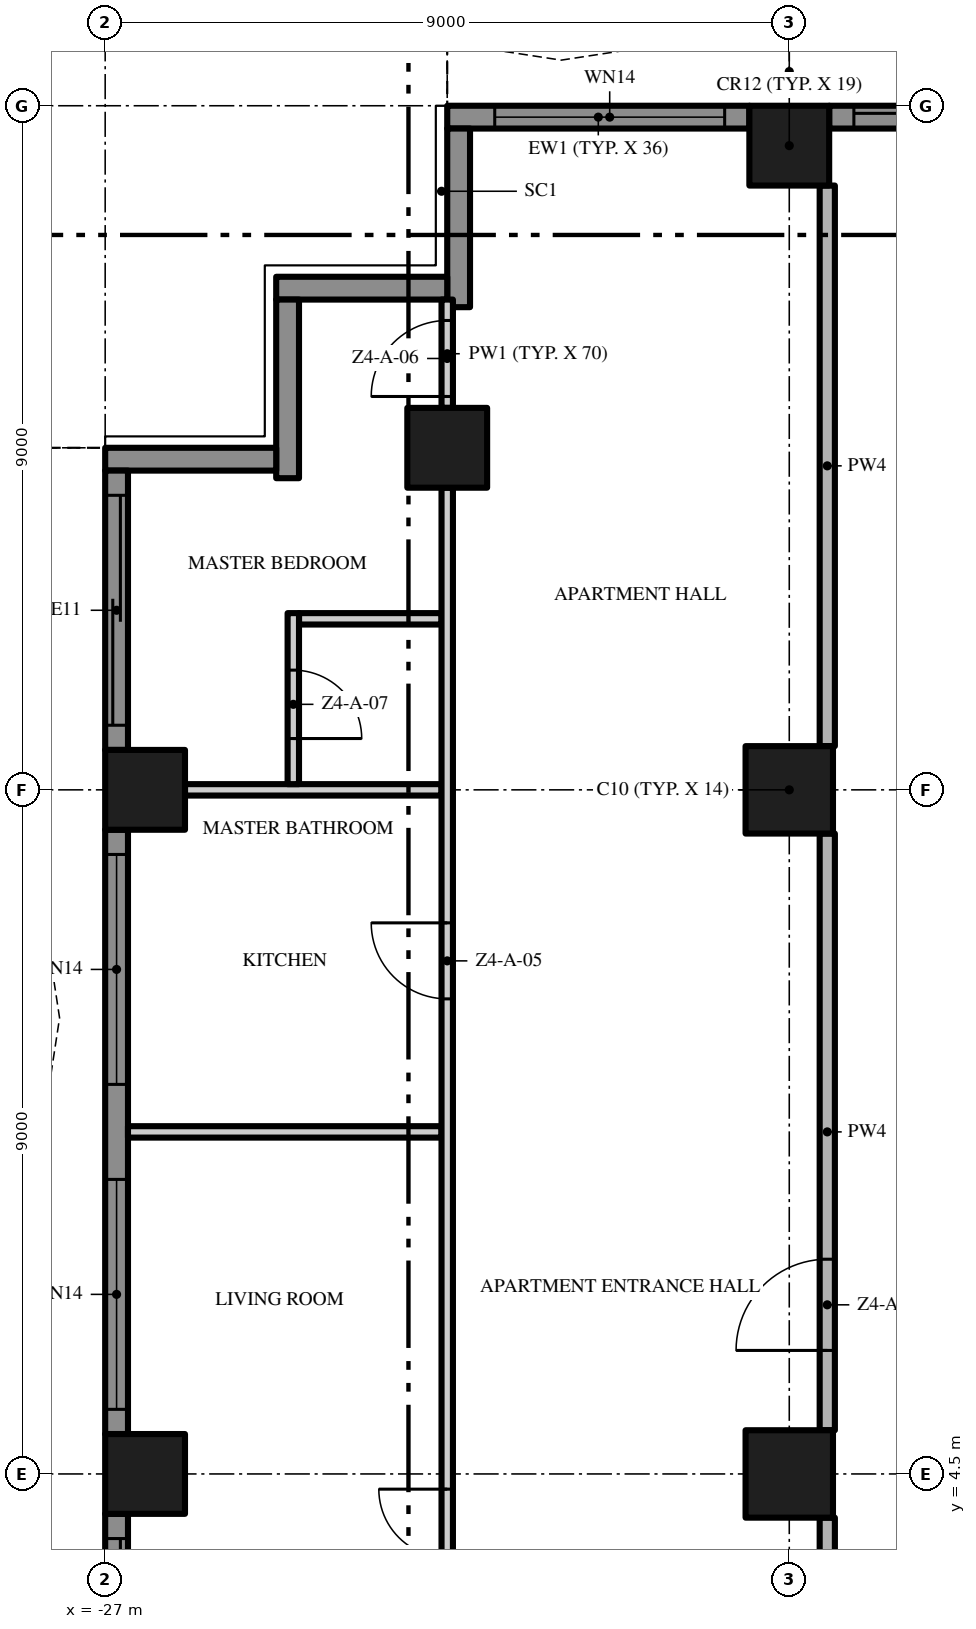
"""IFC4 building model, lengths in metres.
Left out: names, types, materials, properties, quantities, classifications, styles, units other than length and angle.
Written with IfcOpenShell. Run it as: python <this file> out.ifc"""

import sys

from ifc_helpers import new_model, si_unit, direction, frame, frame_2d, origin, origin_2d, place, context, subcontext, project, spatial, polyline, rectangle, outline, extrude, element, fill, save


model = new_model("IFC4")
c1 = context("Model", 3, precision=1e-05, world=origin(), true_north=direction((0.0, 1.0)))
c2 = subcontext(c1, "Body", "Model", "MODEL_VIEW")
j1 = project(units=[si_unit("LENGTHUNIT", "METRE"), si_unit("PLANEANGLEUNIT", "RADIAN")], contexts=[c1])
p1 = place(None, origin())
s1 = spatial("IfcSite", under=j1, at=p1, CompositionType="ELEMENT")
p2 = place(p1, origin())
s2 = spatial("IfcBuilding", under=s1, at=p2, CompositionType="ELEMENT")
p3 = place(p2, frame((0.0, 0.0, 188.2)))
s3 = spatial("IfcBuildingStorey", under=s2, at=p3, CompositionType="ELEMENT", Elevation=188.2)
p4 = place(p3, frame((-18.0, 13.5, 0.0), z_axis=(0.0, 0.0, 1.0), x_axis=(1.0, 0.0, 0.0)))
e1 = element("IfcColumn", 1, at=p4, inside=s3, PredefinedType="COLUMN", context=c2, shape_type="SweptSolid", body=[
    extrude(rectangle(XDim=1.15, YDim=1.15, at=origin_2d()), origin(), (0.0, 0.0, 1.0), 3.5),
])
p5 = place(p3, frame((-18.0, 21.975, 0.0), z_axis=(0.0, 0.0, 1.0), x_axis=(1.0, 0.0, 0.0)))
e2 = element("IfcColumn", 2, at=p5, inside=s3, PredefinedType="COLUMN", context=c2, shape_type="SweptSolid", body=[
    extrude(rectangle(XDim=1.05, YDim=1.05, at=origin_2d()), origin(), (0.0, 0.0, 1.0), 3.5),
])
p6 = place(p3, frame((-18.0, 4.5, 0.0), z_axis=(0.0, 0.0, 1.0), x_axis=(1.0, 0.0, 0.0)))
e3 = element("IfcColumn", 3, at=p6, inside=s3, PredefinedType="COLUMN", context=c2, shape_type="SweptSolid", body=[
    extrude(rectangle(XDim=1.15, YDim=1.15, at=origin_2d()), origin(), (0.0, 0.0, 1.0), 3.5),
])
for number, where, z_axis, x_axis in (
    (4, (-26.475, 13.5, 0.0), (0.0, 0.0, 1.0), (1.0, 0.0, 0.0)),
    (5, (-22.5, 18.0, 0.0), (0.0, 0.0, 1.0), (1.0, 0.0, 0.0)),
    (6, (-26.475, 4.5, 0.0), (0.0, 0.0, 1.0), (1.0, 0.0, 0.0)),
):
    element("IfcColumn", number, at=place(p3, frame(where, z_axis=z_axis, x_axis=x_axis)), inside=s3, PredefinedType="COLUMN", context=c2, shape_type="SweptSolid", body=[
        extrude(rectangle(XDim=1.05, YDim=1.05, at=origin_2d()), origin(), (0.0, 0.0, 1.0), 3.5),
    ])
p7 = place(p3, frame((-17.475, 22.35, 0.0), z_axis=(0.0, 0.0, 1.0), x_axis=(1.0, 0.0, 0.0)))
e7 = element("IfcWall", 7, at=p7, inside=s3, PredefinedType="SOLIDWALL", context=c2, shape_type="SweptSolid", body=[
    extrude(rectangle(XDim=3.975, YDim=0.3, at=frame_2d((1.988, 0.0))), origin(), (0.0, 0.0, 1.0), 3.5),
])
p8 = place(p7, frame((0.325, 0.0, 0.0)))
e8 = element("IfcOpeningElement", 8, at=p8, cuts=e7, PredefinedType="OPENING", context=c2, shape_type="SweptSolid", body=[
    extrude(rectangle(XDim=3.025, YDim=2.4, at=frame_2d((1.512, 1.2))), frame((0.0, 0.16, 0.0), z_axis=(0.0, -1.0, 0.0), x_axis=(1.0, 0.0, 0.0)), (0.0, 0.0, 1.0), 0.32),
])
p9 = place(p3, frame((-22.5, 22.35, 0.0), z_axis=(0.0, 0.0, 1.0), x_axis=(1.0, 0.0, 0.0)))
e9 = element("IfcWall", 9, at=p9, inside=s3, PredefinedType="SOLIDWALL", context=c2, shape_type="SweptSolid", body=[
    extrude(rectangle(XDim=3.975, YDim=0.3, at=frame_2d((1.988, 0.0))), origin(), (0.0, 0.0, 1.0), 3.5),
])
p10 = place(p9, frame((0.625, 0.0, 0.45)))
e10 = element("IfcOpeningElement", 10, at=p10, cuts=e9, PredefinedType="OPENING", context=c2, shape_type="SweptSolid", body=[
    extrude(rectangle(XDim=3.025, YDim=2.65, at=frame_2d((1.512, 1.325))), frame((0.0, 0.16, 0.0), z_axis=(0.0, -1.0, 0.0), x_axis=(1.0, 0.0, 0.0)), (0.0, 0.0, 1.0), 0.32),
])
p11 = place(p3, frame((-22.35, 19.85, 0.0), z_axis=(0.0, 0.0, 1.0), x_axis=(0.0, 1.0, 0.0)))
e11 = element("IfcWall", 11, at=p11, inside=s3, PredefinedType="SOLIDWALL", context=c2, shape_type="SweptSolid", body=[
    extrude(rectangle(XDim=2.35, YDim=0.3, at=frame_2d((1.175, 0.0))), origin(), (0.0, 0.0, 1.0), 3.5),
])
p12 = place(p3, frame((-24.75, 20.1, 0.0), z_axis=(0.0, 0.0, 1.0), x_axis=(1.0, 0.0, 0.0)))
e12 = element("IfcWall", 12, at=p12, inside=s3, PredefinedType="SOLIDWALL", context=c2, shape_type="SweptSolid", body=[
    extrude(rectangle(XDim=2.25, YDim=0.3, at=frame_2d((1.125, 0.0))), origin(), (0.0, 0.0, 1.0), 3.5),
])
p13 = place(p3, frame((-24.6, 17.6, 0.0), z_axis=(0.0, 0.0, 1.0), x_axis=(0.0, 1.0, 0.0)))
e13 = element("IfcWall", 13, at=p13, inside=s3, PredefinedType="SOLIDWALL", context=c2, shape_type="SweptSolid", body=[
    extrude(rectangle(XDim=2.35, YDim=0.3, at=frame_2d((1.175, 0.0))), origin(), (0.0, 0.0, 1.0), 3.5),
])
p14 = place(p3, frame((-27.0, 17.85, 0.0), z_axis=(0.0, 0.0, 1.0), x_axis=(1.0, 0.0, 0.0)))
e14 = element("IfcWall", 14, at=p14, inside=s3, PredefinedType="SOLIDWALL", context=c2, shape_type="SweptSolid", body=[
    extrude(rectangle(XDim=2.25, YDim=0.3, at=frame_2d((1.125, 0.0))), origin(), (0.0, 0.0, 1.0), 3.5),
])
p15 = place(p3, frame((-26.85, 14.025, 0.0), z_axis=(0.0, 0.0, 1.0), x_axis=(0.0, 1.0, 0.0)))
e15 = element("IfcWall", 15, at=p15, inside=s3, PredefinedType="SOLIDWALL", context=c2, shape_type="SweptSolid", body=[
    extrude(rectangle(XDim=3.675, YDim=0.3, at=frame_2d((1.837, 0.0))), origin(), (0.0, 0.0, 1.0), 3.5),
])
p16 = place(p15, frame((0.325, 0.0, 0.0)))
e16 = element("IfcOpeningElement", 16, at=p16, cuts=e15, PredefinedType="OPENING", context=c2, shape_type="SweptSolid", body=[
    extrude(rectangle(XDim=3.025, YDim=2.4, at=frame_2d((1.512, 1.2))), frame((0.0, 0.16, 0.0), z_axis=(0.0, -1.0, 0.0), x_axis=(1.0, 0.0, 0.0)), (0.0, 0.0, 1.0), 0.32),
])
p17 = place(p3, frame((-26.85, 5.025, 0.0), z_axis=(0.0, 0.0, 1.0), x_axis=(0.0, 1.0, 0.0)))
e17 = element("IfcWall", 17, at=p17, inside=s3, PredefinedType="SOLIDWALL", context=c2, shape_type="SweptSolid", body=[
    extrude(rectangle(XDim=7.95, YDim=0.3, at=frame_2d((3.975, 0.0))), origin(), (0.0, 0.0, 1.0), 3.5),
])
p18 = place(p17, frame((4.6, 0.0, 0.45)))
e18 = element("IfcOpeningElement", 18, at=p18, cuts=e17, PredefinedType="OPENING", context=c2, shape_type="SweptSolid", body=[
    extrude(rectangle(XDim=3.025, YDim=2.65, at=frame_2d((1.512, 1.325))), frame((0.0, 0.16, 0.0), z_axis=(0.0, -1.0, 0.0), x_axis=(1.0, 0.0, 0.0)), (0.0, 0.0, 1.0), 0.32),
])
p19 = place(p17, frame((0.325, 0.0, 0.45)))
e19 = element("IfcOpeningElement", 19, at=p19, cuts=e17, PredefinedType="OPENING", context=c2, shape_type="SweptSolid", body=[
    extrude(rectangle(XDim=3.025, YDim=2.65, at=frame_2d((1.512, 1.325))), frame((0.0, 0.16, 0.0), z_axis=(0.0, -1.0, 0.0), x_axis=(1.0, 0.0, 0.0)), (0.0, 0.0, 1.0), 0.32),
])
p20 = place(p3, frame((-26.85, -3.975, 0.0), z_axis=(0.0, 0.0, 1.0), x_axis=(0.0, 1.0, 0.0)))
e20 = element("IfcWall", 20, at=p20, inside=s3, PredefinedType="SOLIDWALL", context=c2, shape_type="SweptSolid", body=[
    extrude(rectangle(XDim=7.95, YDim=0.3, at=frame_2d((3.975, 0.0))), origin(), (0.0, 0.0, 1.0), 3.5),
])
p21 = place(p20, frame((4.6, 0.0, 0.0)))
e21 = element("IfcOpeningElement", 21, at=p21, cuts=e20, PredefinedType="OPENING", context=c2, shape_type="SweptSolid", body=[
    extrude(rectangle(XDim=3.025, YDim=2.4, at=frame_2d((1.512, 1.2))), frame((0.0, 0.16, 0.0), z_axis=(0.0, -1.0, 0.0), x_axis=(1.0, 0.0, 0.0)), (0.0, 0.0, 1.0), 0.32),
])
p22 = place(p20, frame((0.325, 0.0, 0.45)))
e22 = element("IfcOpeningElement", 22, at=p22, cuts=e20, PredefinedType="OPENING", context=c2, shape_type="SweptSolid", body=[
    extrude(rectangle(XDim=3.025, YDim=2.65, at=frame_2d((1.512, 1.325))), frame((0.0, 0.16, 0.0), z_axis=(0.0, -1.0, 0.0), x_axis=(1.0, 0.0, 0.0)), (0.0, 0.0, 1.0), 0.32),
])
p23 = place(p3, origin())
e23 = element("IfcWall", 23, at=p23, inside=s3, PredefinedType="USERDEFINED", context=c2, shape_type="SweptSolid", body=[
    extrude(outline(polyline([(-13.5, 25.5), (-15.0, 25.271), (-16.5, 24.671), (-18.0, 23.929), (-19.5, 23.329), (-21.0, 23.1), (-22.5, 23.329), (-22.538, 23.082), (-21.0, 22.847), (-19.434, 23.086), (-17.898, 23.701), (-16.398, 24.442), (-14.934, 25.028), (-13.462, 25.253), (-13.5, 25.5)])), origin(), (0.0, 0.0, 1.0), 0.9),
])
p24 = place(p3, origin())
e24 = element("IfcWall", 24, at=p24, inside=s3, PredefinedType="USERDEFINED", context=c2, shape_type="SweptSolid", body=[
    extrude(outline(polyline([(-30.0, 18.0), (-29.771, 16.5), (-29.171, 15.0), (-28.429, 13.5), (-27.829, 12.0), (-27.6, 10.5), (-27.829, 9.0), (-28.429, 7.5), (-29.171, 6.0), (-29.771, 4.5), (-30.0, 3.0), (-29.771, 1.5), (-29.171, 0.0), (-28.429, -1.5), (-27.829, -3.0), (-27.6, -4.5), (-27.829, -6.0), (-28.429, -7.5), (-29.171, -9.0), (-29.771, -10.5), (-30.0, -12.0), (-29.771, -13.5), (-29.171, -15.0), (-28.429, -16.5), (-27.829, -18.0), (-27.597, -17.907), (-28.201, -16.398), (-28.942, -14.898), (-29.528, -13.434), (-29.747, -12.0), (-29.528, -10.566), (-28.942, -9.102), (-28.201, -7.602), (-27.586, -6.066), (-27.347, -4.5), (-27.586, -2.934), (-28.201, -1.398), (-28.942, 0.102), (-29.528, 1.566), (-29.747, 3.0), (-29.528, 4.434), (-28.942, 5.898), (-28.201, 7.398), (-27.586, 8.934), (-27.347, 10.5), (-27.586, 12.066), (-28.201, 13.602), (-28.942, 15.102), (-29.528, 16.566), (-29.753, 18.038), (-30.0, 18.0)])), origin(), (0.0, 0.0, 1.0), 0.9),
])
p25 = place(p3, frame((-26.7, 9.0, 0.0), z_axis=(0.0, 0.0, 1.0), x_axis=(1.0, 0.0, 0.0)))
e25 = element("IfcWall", 25, at=p25, inside=s3, PredefinedType="PARTITIONING", context=c2, shape_type="SweptSolid", body=[
    extrude(rectangle(XDim=4.125, YDim=0.15, at=frame_2d((2.062, 0.0))), origin(), (0.0, 0.0, 1.0), 3.5),
])
p26 = place(p3, frame((-25.95, 13.5, 0.0), z_axis=(0.0, 0.0, 1.0), x_axis=(1.0, 0.0, 0.0)))
e26 = element("IfcWall", 26, at=p26, inside=s3, PredefinedType="PARTITIONING", context=c2, shape_type="SweptSolid", body=[
    extrude(rectangle(XDim=3.375, YDim=0.15, at=frame_2d((1.688, 0.0))), origin(), (0.0, 0.0, 1.0), 3.5),
])
p27 = place(p3, frame((-24.45, 15.75, 0.0), z_axis=(0.0, 0.0, 1.0), x_axis=(1.0, 0.0, 0.0)))
e27 = element("IfcWall", 27, at=p27, inside=s3, PredefinedType="PARTITIONING", context=c2, shape_type="SweptSolid", body=[
    extrude(rectangle(XDim=1.875, YDim=0.15, at=frame_2d((0.938, 0.0))), origin(), (0.0, 0.0, 1.0), 3.5),
])
p28 = place(p3, frame((-24.525, 15.825, 0.0), z_axis=(0.0, 0.0, 1.0), x_axis=(0.0, -1.0, 0.0)))
e28 = element("IfcWall", 28, at=p28, inside=s3, PredefinedType="PARTITIONING", context=c2, shape_type="SweptSolid", body=[
    extrude(rectangle(XDim=2.25, YDim=0.15, at=frame_2d((1.125, 0.0))), origin(), (0.0, 0.0, 1.0), 3.5),
])
p29 = place(p28, frame((0.75, 0.0, 0.0)))
e29 = element("IfcOpeningElement", 29, at=p29, cuts=e28, PredefinedType="OPENING", context=c2, shape_type="SweptSolid", body=[
    extrude(rectangle(XDim=0.9, YDim=2.1, at=frame_2d((0.45, 1.05))), frame((0.0, 0.085, 0.0), z_axis=(0.0, -1.0, 0.0), x_axis=(1.0, 0.0, 0.0)), (0.0, 0.0, 1.0), 0.17),
])
p30 = place(p3, frame((-22.5, 0.1, 0.0), z_axis=(0.0, 0.0, 1.0), x_axis=(0.0, 1.0, 0.0)))
e30 = element("IfcWall", 30, at=p30, inside=s3, PredefinedType="PARTITIONING", context=c2, shape_type="SweptSolid", body=[
    extrude(rectangle(XDim=17.375, YDim=0.15, at=frame_2d((8.688, 0.0))), origin(), (0.0, 0.0, 1.0), 3.5),
])
p31 = place(p30, frame((2.4, 0.0, 0.0)))
e31 = element("IfcOpeningElement", 31, at=p31, cuts=e30, PredefinedType="OPENING", context=c2, shape_type="SweptSolid", body=[
    extrude(rectangle(XDim=1.8, YDim=2.4, at=frame_2d((0.9, 1.2))), frame((0.0, 0.085, 0.0), z_axis=(0.0, -1.0, 0.0), x_axis=(1.0, 0.0, 0.0)), (0.0, 0.0, 1.0), 0.17),
])
p32 = place(p30, frame((10.65, 0.0, 0.0)))
e32 = element("IfcOpeningElement", 32, at=p32, cuts=e30, PredefinedType="OPENING", context=c2, shape_type="SweptSolid", body=[
    extrude(rectangle(XDim=1.0, YDim=2.4, at=frame_2d((0.5, 1.2))), frame((0.0, 0.085, 0.0), z_axis=(0.0, -1.0, 0.0), x_axis=(1.0, 0.0, 0.0)), (0.0, 0.0, 1.0), 0.17),
])
p33 = place(p3, frame((-22.5, 18.525, 0.0), z_axis=(0.0, 0.0, 1.0), x_axis=(0.0, 1.0, 0.0)))
e33 = element("IfcWall", 33, at=p33, inside=s3, PredefinedType="PARTITIONING", context=c2, shape_type="SweptSolid", body=[
    extrude(rectangle(XDim=1.425, YDim=0.15, at=frame_2d((0.713, 0.0))), origin(), (0.0, 0.0, 1.0), 3.5),
])
p34 = place(p33, frame((0.15, 0.0, 0.0)))
e34 = element("IfcOpeningElement", 34, at=p34, cuts=e33, PredefinedType="OPENING", context=c2, shape_type="SweptSolid", body=[
    extrude(rectangle(XDim=1.0, YDim=2.4, at=frame_2d((0.5, 1.2))), frame((0.0, 0.085, 0.0), z_axis=(0.0, -1.0, 0.0), x_axis=(1.0, 0.0, 0.0)), (0.0, 0.0, 1.0), 0.17),
])
p35 = place(p3, frame((-17.5, -0.2, 0.0), z_axis=(0.0, 0.0, 1.0), x_axis=(0.0, 1.0, 0.0)))
e35 = element("IfcWall", 35, at=p35, inside=s3, PredefinedType="PARTITIONING", context=c2, shape_type="SweptSolid", body=[
    extrude(rectangle(XDim=4.125, YDim=0.2, at=frame_2d((2.062, 0.0))), origin(), (0.0, 0.0, 1.0), 3.5),
])
p36 = place(p3, frame((-17.5, 5.075, 0.0), z_axis=(0.0, 0.0, 1.0), x_axis=(0.0, 1.0, 0.0)))
e36 = element("IfcWall", 36, at=p36, inside=s3, PredefinedType="PARTITIONING", context=c2, shape_type="SweptSolid", body=[
    extrude(rectangle(XDim=7.85, YDim=0.2, at=frame_2d((3.925, 0.0))), origin(), (0.0, 0.0, 1.0), 3.5),
])
p37 = place(p36, frame((1.05, 0.0, 0.0)))
e37 = element("IfcOpeningElement", 37, at=p37, cuts=e36, PredefinedType="OPENING", context=c2, shape_type="SweptSolid", body=[
    extrude(rectangle(XDim=1.2, YDim=2.4, at=frame_2d((0.6, 1.2))), frame((0.0, 0.11, 0.0), z_axis=(0.0, -1.0, 0.0), x_axis=(1.0, 0.0, 0.0)), (0.0, 0.0, 1.0), 0.22),
])
p38 = place(p3, frame((-17.5, 14.075, 0.0), z_axis=(0.0, 0.0, 1.0), x_axis=(0.0, 1.0, 0.0)))
e38 = element("IfcWall", 38, at=p38, inside=s3, PredefinedType="PARTITIONING", context=c2, shape_type="SweptSolid", body=[
    extrude(rectangle(XDim=7.375, YDim=0.2, at=frame_2d((3.688, 0.0))), origin(), (0.0, 0.0, 1.0), 3.5),
])
p39 = place(p8, origin())
e39 = element("IfcDoor", 39, at=p39, inside=s3, OperationType="SINGLE_SWING_LEFT", PredefinedType="DOOR", context=c2, shape_type="SweptSolid", body=[
    extrude(rectangle(XDim=3.025, YDim=2.4, at=frame_2d((1.512, 1.2))), frame((0.0, 0.025, 0.0), z_axis=(0.0, -1.0, 0.0), x_axis=(1.0, 0.0, 0.0)), (0.0, 0.0, 1.0), 0.05),
])
fill(e8, e39)
p40 = place(p10, origin())
e40 = element("IfcWindow", 40, at=p40, inside=s3, PartitioningType="SINGLE_PANEL", PredefinedType="WINDOW", context=c2, shape_type="SweptSolid", body=[
    extrude(rectangle(XDim=3.025, YDim=2.65, at=frame_2d((1.512, 1.325))), frame((0.0, 0.03, 0.0), z_axis=(0.0, -1.0, 0.0), x_axis=(1.0, 0.0, 0.0)), (0.0, 0.0, 1.0), 0.06),
])
fill(e10, e40)
p41 = place(p16, origin())
e41 = element("IfcDoor", 41, at=p41, inside=s3, OperationType="SINGLE_SWING_LEFT", PredefinedType="DOOR", context=c2, shape_type="SweptSolid", body=[
    extrude(rectangle(XDim=3.025, YDim=2.4, at=frame_2d((1.512, 1.2))), frame((0.0, 0.025, 0.0), z_axis=(0.0, -1.0, 0.0), x_axis=(1.0, 0.0, 0.0)), (0.0, 0.0, 1.0), 0.05),
])
fill(e16, e41)
p42 = place(p18, origin())
e42 = element("IfcWindow", 42, at=p42, inside=s3, PartitioningType="SINGLE_PANEL", PredefinedType="WINDOW", context=c2, shape_type="SweptSolid", body=[
    extrude(rectangle(XDim=3.025, YDim=2.65, at=frame_2d((1.512, 1.325))), frame((0.0, 0.03, 0.0), z_axis=(0.0, -1.0, 0.0), x_axis=(1.0, 0.0, 0.0)), (0.0, 0.0, 1.0), 0.06),
])
fill(e18, e42)
p43 = place(p19, origin())
e43 = element("IfcWindow", 43, at=p43, inside=s3, PartitioningType="SINGLE_PANEL", PredefinedType="WINDOW", context=c2, shape_type="SweptSolid", body=[
    extrude(rectangle(XDim=3.025, YDim=2.65, at=frame_2d((1.512, 1.325))), frame((0.0, 0.03, 0.0), z_axis=(0.0, -1.0, 0.0), x_axis=(1.0, 0.0, 0.0)), (0.0, 0.0, 1.0), 0.06),
])
fill(e19, e43)
p44 = place(p21, origin())
e44 = element("IfcDoor", 44, at=p44, inside=s3, OperationType="SINGLE_SWING_LEFT", PredefinedType="DOOR", context=c2, shape_type="SweptSolid", body=[
    extrude(rectangle(XDim=3.025, YDim=2.4, at=frame_2d((1.512, 1.2))), frame((0.0, 0.025, 0.0), z_axis=(0.0, -1.0, 0.0), x_axis=(1.0, 0.0, 0.0)), (0.0, 0.0, 1.0), 0.05),
])
fill(e21, e44)
p45 = place(p37, origin())
e45 = element("IfcDoor", 45, at=p45, inside=s3, OperationType="SINGLE_SWING_LEFT", PredefinedType="DOOR", context=c2, shape_type="SweptSolid", body=[
    extrude(rectangle(XDim=1.2, YDim=2.4, at=frame_2d((0.6, 1.2))), frame((0.0, 0.025, 0.0), z_axis=(0.0, -1.0, 0.0), x_axis=(1.0, 0.0, 0.0)), (0.0, 0.0, 1.0), 0.05),
])
fill(e37, e45)
p46 = place(p31, origin())
e46 = element("IfcDoor", 46, at=p46, inside=s3, OperationType="DOUBLE_DOOR_SINGLE_SWING", PredefinedType="DOOR", context=c2, shape_type="SweptSolid", body=[
    extrude(rectangle(XDim=1.8, YDim=2.4, at=frame_2d((0.9, 1.2))), frame((0.0, 0.025, 0.0), z_axis=(0.0, -1.0, 0.0), x_axis=(1.0, 0.0, 0.0)), (0.0, 0.0, 1.0), 0.05),
])
fill(e31, e46)
p47 = place(p32, origin())
e47 = element("IfcDoor", 47, at=p47, inside=s3, OperationType="SINGLE_SWING_RIGHT", PredefinedType="DOOR", context=c2, shape_type="SweptSolid", body=[
    extrude(rectangle(XDim=1.0, YDim=2.4, at=frame_2d((0.5, 1.2))), frame((0.0, 0.025, 0.0), z_axis=(0.0, -1.0, 0.0), x_axis=(1.0, 0.0, 0.0)), (0.0, 0.0, 1.0), 0.05),
])
fill(e32, e47)
p48 = place(p34, origin())
e48 = element("IfcDoor", 48, at=p48, inside=s3, OperationType="SINGLE_SWING_LEFT", PredefinedType="DOOR", context=c2, shape_type="SweptSolid", body=[
    extrude(rectangle(XDim=1.0, YDim=2.4, at=frame_2d((0.5, 1.2))), frame((0.0, 0.025, 0.0), z_axis=(0.0, -1.0, 0.0), x_axis=(1.0, 0.0, 0.0)), (0.0, 0.0, 1.0), 0.05),
])
fill(e34, e48)
p49 = place(p29, origin())
e49 = element("IfcDoor", 49, at=p49, inside=s3, OperationType="SINGLE_SWING_RIGHT", PredefinedType="DOOR", context=c2, shape_type="SweptSolid", body=[
    extrude(rectangle(XDim=0.9, YDim=2.1, at=frame_2d((0.45, 1.05))), frame((0.0, 0.025, 0.0), z_axis=(0.0, -1.0, 0.0), x_axis=(1.0, 0.0, 0.0)), (0.0, 0.0, 1.0), 0.05),
])
fill(e29, e49)
save(model, sys.argv[1])
